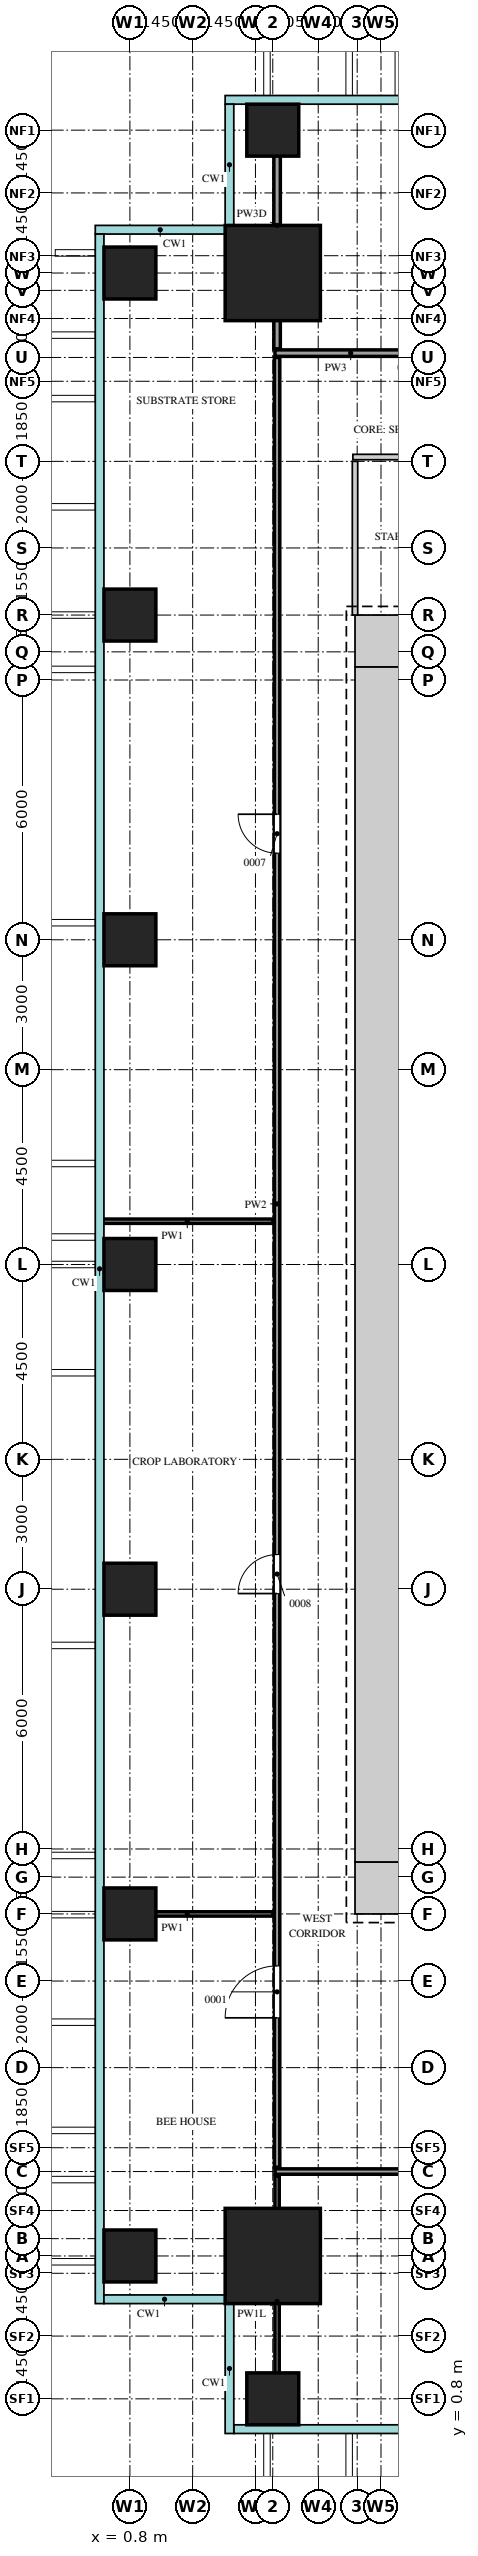
"""IFC4 building model, lengths in metres.
Left out: names, types, materials, properties, quantities, classifications, styles, units other than length and angle.
Written with IfcOpenShell. Run it as: python <this file> out.ifc"""

import sys

from ifc_helpers import new_model, si_unit, direction, frame, frame_2d, origin, origin_2d, place, context, subcontext, project, spatial, rectangle, extrude, source, transform, mapped, element, fill, save


model = new_model("IFC4")
c1 = context("Model", 3, precision=1e-05, world=origin(), true_north=direction((0.0, 1.0)))
c2 = subcontext(c1, "Body", "Model", "MODEL_VIEW")
j1 = project(units=[si_unit("LENGTHUNIT", "METRE"), si_unit("PLANEANGLEUNIT", "RADIAN")], contexts=[c1])
p1 = place(None, origin())
s1 = spatial("IfcSite", under=j1, at=p1, CompositionType="ELEMENT")
p2 = place(p1, origin())
s2 = spatial("IfcBuilding", under=s1, at=p2, CompositionType="ELEMENT")
p3 = place(p2, frame((0.0, 0.0, 73.5)))
s3 = spatial("IfcBuildingStorey", under=s2, at=p3, CompositionType="ELEMENT", Elevation=73.5)
m1 = source(origin(), c2, "Body", "SweptSolid", [
    extrude(rectangle(XDim=1.2, YDim=1.2, at=frame_2d((0.6, 0.0))), origin(), (0.0, 0.0, 1.0), 4.2),
])
for number, where, z_axis, x_axis in (
    (1, (6.0, 41.4, 0.0), (0.0, 0.0, 1.0), (1.0, 0.0, 0.0)),
    (2, (6.0, 12.6, 0.0), (0.0, 0.0, 1.0), (1.0, 0.0, 0.0)),
):
    element("IfcWall", number, at=place(p3, frame(where, z_axis=z_axis, x_axis=x_axis)), inside=s3, PredefinedType="SHEAR", context=c2, shape_type="MappedRepresentation", body=[
        mapped(m1, transform((0.0, 0.0, 0.0))),
    ])
m2 = source(origin(), c2, "Body", "SweptSolid", [
    extrude(rectangle(XDim=27.6, YDim=1.2, at=frame_2d((13.8, 0.0))), origin(), (0.0, 0.0, 1.0), 4.2),
])
p4 = place(p3, frame((6.6, 13.2, 0.0), z_axis=(0.0, 0.0, 1.0), x_axis=(0.0, 1.0, 0.0)))
e3 = element("IfcWall", 3, at=p4, inside=s3, PredefinedType="SHEAR", context=c2, shape_type="MappedRepresentation", body=[
    mapped(m2, transform((0.0, 0.0, 0.0))),
])
m3 = source(origin(), c2, "Body", "SweptSolid", [
    extrude(rectangle(XDim=2.2, YDim=2.2, at=origin_2d()), origin(), (0.0, 0.0, 1.0), 4.5),
])
for number, where, z_axis, x_axis in (
    (4, (4.1, 49.9, 0.0), (0.0, 0.0, 1.0), (1.0, 0.0, 0.0)),
    (5, (4.1, 4.1, 0.0), (0.0, 0.0, 1.0), (1.0, 0.0, 0.0)),
):
    element("IfcColumn", number, at=place(p3, frame(where, z_axis=z_axis, x_axis=x_axis)), inside=s3, PredefinedType="COLUMN", context=c2, shape_type="MappedRepresentation", body=[
        mapped(m3, transform((0.0, 0.0, 0.0))),
    ])
m4 = source(origin(), c2, "Body", "SweptSolid", [
    extrude(rectangle(XDim=1.2, YDim=1.2, at=origin_2d()), origin(), (0.0, 0.0, 1.0), 4.2),
])
for number, where, z_axis, x_axis in (
    (6, (4.1, 0.8, 0.0), (0.0, 0.0, 1.0), (1.0, 0.0, 0.0)),
    (7, (4.1, 53.2, 0.0), (0.0, 0.0, 1.0), (1.0, 0.0, 0.0)),
    (8, (0.8, 4.1, 0.0), (0.0, 0.0, 1.0), (1.0, 0.0, 0.0)),
    (9, (0.8, 12.0, 0.0), (0.0, 0.0, 1.0), (1.0, 0.0, 0.0)),
    (10, (0.8, 19.5, 0.0), (0.0, 0.0, 1.0), (1.0, 0.0, 0.0)),
    (11, (0.8, 27.0, 0.0), (0.0, 0.0, 1.0), (1.0, 0.0, 0.0)),
    (12, (0.8, 34.5, 0.0), (0.0, 0.0, 1.0), (1.0, 0.0, 0.0)),
    (13, (0.8, 42.0, 0.0), (0.0, 0.0, 1.0), (1.0, 0.0, 0.0)),
    (14, (0.8, 49.9, 0.0), (0.0, 0.0, 1.0), (1.0, 0.0, 0.0)),
):
    element("IfcColumn", number, at=place(p3, frame(where, z_axis=z_axis, x_axis=x_axis)), inside=s3, PredefinedType="COLUMN", context=c2, shape_type="MappedRepresentation", body=[
        mapped(m4, transform((0.0, 0.0, 0.0))),
    ])
m5 = source(origin(), c2, "Body", "SweptSolid", [
    extrude(rectangle(XDim=5.8, YDim=0.1, at=frame_2d((2.9, 0.0))), origin(), (0.0, 0.0, 1.0), 3.6),
])
p5 = place(p3, frame((4.2, 0.15, 0.0), z_axis=(0.0, 0.0, 1.0), x_axis=(0.0, 1.0, 0.0)))
e15 = element("IfcWall", 15, at=p5, inside=s3, PredefinedType="PARTITIONING", context=c2, shape_type="MappedRepresentation", body=[
    mapped(m5, transform((0.0, 0.0, 0.0))),
])
m6 = source(origin(), c2, "Body", "SweptSolid", [
    extrude(rectangle(XDim=22.15, YDim=0.125, at=frame_2d((11.075, 0.0))), origin(), (0.0, 0.0, 1.0), 4.3),
])
p6 = place(p3, frame((4.15, 6.05, 0.0), z_axis=(0.0, 0.0, 1.0), x_axis=(1.0, 0.0, 0.0)))
e16 = element("IfcWall", 16, at=p6, inside=s3, PredefinedType="PARTITIONING", context=c2, shape_type="MappedRepresentation", body=[
    mapped(m6, transform((0.0, 0.0, 0.0))),
])
m7 = source(origin(), c2, "Body", "SweptSolid", [
    extrude(rectangle(XDim=1.2, YDim=2.1, at=frame_2d((0.6, 1.05))), frame((0.0, 0.073, 0.0), z_axis=(0.0, -1.0, 0.0), x_axis=(1.0, 0.0, 0.0)), (0.0, 0.0, 1.0), 0.145),
])
p7 = place(p6, frame((9.2, 0.0, 0.0)))
e17 = element("IfcOpeningElement", 17, at=p7, cuts=e16, PredefinedType="OPENING", context=c2, shape_type="MappedRepresentation", body=[
    mapped(m7, transform((0.0, 0.0, 0.0))),
])
m8 = source(origin(), c2, "Body", "SweptSolid", [
    extrude(rectangle(XDim=41.8, YDim=0.125, at=frame_2d((20.9, 0.0))), origin(), (0.0, 0.0, 1.0), 4.3),
])
p8 = place(p3, frame((4.2, 6.15, 0.0), z_axis=(0.0, 0.0, 1.0), x_axis=(0.0, 1.0, 0.0)))
e18 = element("IfcWall", 18, at=p8, inside=s3, PredefinedType="PARTITIONING", context=c2, shape_type="MappedRepresentation", body=[
    mapped(m8, transform((0.0, 0.0, 0.0))),
])
p9 = place(p8, frame((3.45, 0.0, 0.0)))
e19 = element("IfcOpeningElement", 19, at=p9, cuts=e18, PredefinedType="OPENING", context=c2, shape_type="MappedRepresentation", body=[
    mapped(m7, transform((0.0, 0.0, 0.0))),
])
m9 = source(origin(), c2, "Body", "SweptSolid", [
    extrude(rectangle(XDim=0.9, YDim=2.1, at=frame_2d((0.45, 1.05))), frame((0.0, 0.073, 0.0), z_axis=(0.0, -1.0, 0.0), x_axis=(1.0, 0.0, 0.0)), (0.0, 0.0, 1.0), 0.145),
])
p10 = place(p8, frame((13.25, 0.0, 0.0)))
e20 = element("IfcOpeningElement", 20, at=p10, cuts=e18, PredefinedType="OPENING", context=c2, shape_type="MappedRepresentation", body=[
    mapped(m9, transform((0.0, 0.0, 0.0))),
])
p11 = place(p8, frame((30.35, 0.0, 0.0)))
e21 = element("IfcOpeningElement", 21, at=p11, cuts=e18, PredefinedType="OPENING", context=c2, shape_type="MappedRepresentation", body=[
    mapped(m9, transform((0.0, 0.0, 0.0))),
])
m10 = source(origin(), c2, "Body", "SweptSolid", [
    extrude(rectangle(XDim=3.95, YDim=0.1, at=frame_2d((1.975, 0.0))), origin(), (0.0, 0.0, 1.0), 4.3),
])
for number, where, z_axis, x_axis in (
    (22, (0.15, 12.0, 0.0), (0.0, 0.0, 1.0), (1.0, 0.0, 0.0)),
    (23, (0.15, 28.0, 0.0), (0.0, 0.0, 1.0), (1.0, 0.0, 0.0)),
):
    element("IfcWall", number, at=place(p3, frame(where, z_axis=z_axis, x_axis=x_axis)), inside=s3, PredefinedType="PARTITIONING", context=c2, shape_type="MappedRepresentation", body=[
        mapped(m10, transform((0.0, 0.0, 0.0))),
    ])
m11 = source(origin(), c2, "Body", "SweptSolid", [
    extrude(rectangle(XDim=3.55, YDim=0.125, at=frame_2d((1.775, 0.0))), origin(), (0.0, 0.0, 1.0), 4.3),
])
p12 = place(p3, frame((6.0, 42.0, 0.0), z_axis=(0.0, 0.0, 1.0), x_axis=(0.0, 1.0, 0.0)))
e24 = element("IfcWall", 24, at=p12, inside=s3, PredefinedType="PARTITIONING", context=c2, shape_type="MappedRepresentation", body=[
    mapped(m11, transform((0.0, 0.0, 0.0))),
])
m12 = source(origin(), c2, "Body", "SweptSolid", [
    extrude(rectangle(XDim=7.95, YDim=0.125, at=frame_2d((3.975, 0.0))), origin(), (0.0, 0.0, 1.0), 4.3),
])
p13 = place(p3, frame((5.95, 45.65, 0.0), z_axis=(0.0, 0.0, 1.0), x_axis=(1.0, 0.0, 0.0)))
e25 = element("IfcWall", 25, at=p13, inside=s3, PredefinedType="PARTITIONING", context=c2, shape_type="MappedRepresentation", body=[
    mapped(m12, transform((0.0, 0.0, 0.0))),
])
p14 = place(p13, frame((3.55, 0.0, 0.0)))
e26 = element("IfcOpeningElement", 26, at=p14, cuts=e25, PredefinedType="OPENING", context=c2, shape_type="MappedRepresentation", body=[
    mapped(m9, transform((0.0, 0.0, 0.0))),
])
m13 = source(origin(), c2, "Body", "SweptSolid", [
    extrude(rectangle(XDim=7.8, YDim=0.15, at=frame_2d((3.9, 0.0))), origin(), (0.0, 0.0, 1.0), 4.3),
])
p15 = place(p3, frame((4.15, 48.05, 0.0), z_axis=(0.0, 0.0, 1.0), x_axis=(1.0, 0.0, 0.0)))
e27 = element("IfcWall", 27, at=p15, inside=s3, PredefinedType="PARTITIONING", context=c2, shape_type="MappedRepresentation", body=[
    mapped(m13, transform((0.0, 0.0, 0.0))),
])
m14 = source(origin(), c2, "Body", "SweptSolid", [
    extrude(rectangle(XDim=0.9, YDim=2.1, at=frame_2d((0.45, 1.05))), frame((0.0, 0.085, 0.0), z_axis=(0.0, -1.0, 0.0), x_axis=(1.0, 0.0, 0.0)), (0.0, 0.0, 1.0), 0.17),
])
p16 = place(p15, frame((3.5, 0.0, 0.0)))
e28 = element("IfcOpeningElement", 28, at=p16, cuts=e27, PredefinedType="OPENING", context=c2, shape_type="MappedRepresentation", body=[
    mapped(m14, transform((0.0, 0.0, 0.0))),
])
m15 = source(origin(), c2, "Body", "SweptSolid", [
    extrude(rectangle(XDim=5.7, YDim=0.15, at=frame_2d((2.85, 0.0))), origin(), (0.0, 0.0, 1.0), 3.6),
])
p17 = place(p3, frame((4.2, 48.15, 0.0), z_axis=(0.0, 0.0, 1.0), x_axis=(0.0, 1.0, 0.0)))
e29 = element("IfcWall", 29, at=p17, inside=s3, PredefinedType="PARTITIONING", context=c2, shape_type="MappedRepresentation", body=[
    mapped(m15, transform((0.0, 0.0, 0.0))),
])
m16 = source(origin(), c2, "Body", "SweptSolid", [
    extrude(rectangle(XDim=1.2, YDim=2.1, at=frame_2d((0.6, 1.05))), frame((0.0, 0.025, 0.0), z_axis=(0.0, -1.0, 0.0), x_axis=(1.0, 0.0, 0.0)), (0.0, 0.0, 1.0), 0.05),
])
p18 = place(p9, origin())
e30 = element("IfcDoor", 30, at=p18, inside=s3, OperationType="SINGLE_SWING_RIGHT", PredefinedType="DOOR", context=c2, shape_type="MappedRepresentation", body=[
    mapped(m16, transform((0.0, 0.0, 0.0))),
])
fill(e19, e30)
m17 = source(origin(), c2, "Body", "SweptSolid", [
    extrude(rectangle(XDim=0.9, YDim=2.1, at=frame_2d((0.45, 1.05))), frame((0.0, 0.025, 0.0), z_axis=(0.0, -1.0, 0.0), x_axis=(1.0, 0.0, 0.0)), (0.0, 0.0, 1.0), 0.05),
])
p19 = place(p10, origin())
e31 = element("IfcDoor", 31, at=p19, inside=s3, OperationType="SINGLE_SWING_RIGHT", PredefinedType="DOOR", context=c2, shape_type="MappedRepresentation", body=[
    mapped(m17, transform((0.0, 0.0, 0.0))),
])
fill(e20, e31)
p20 = place(p11, origin())
e32 = element("IfcDoor", 32, at=p20, inside=s3, OperationType="SINGLE_SWING_LEFT", PredefinedType="DOOR", context=c2, shape_type="MappedRepresentation", body=[
    mapped(m17, transform((0.0, 0.0, 0.0))),
])
fill(e21, e32)
save(model, sys.argv[1])
